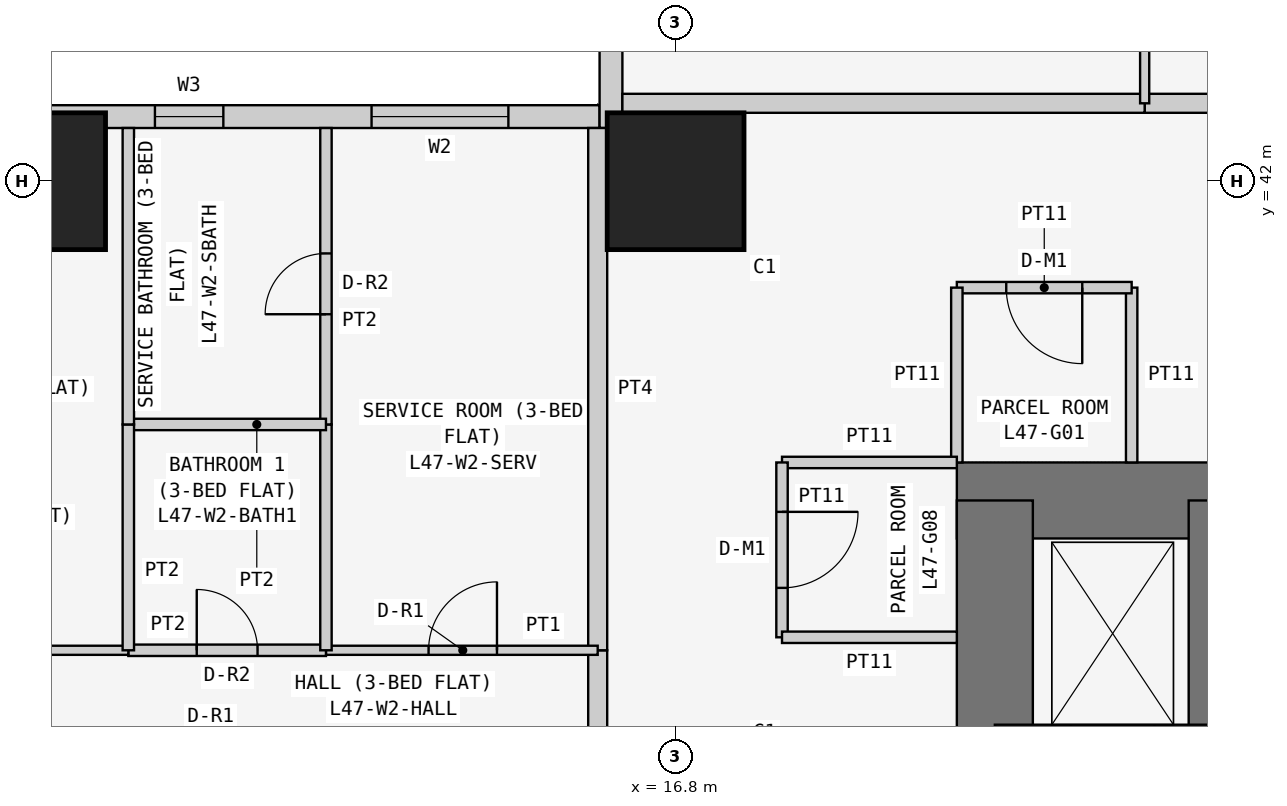
"""IFC4 building model, lengths in metres.
Left out: names, types, materials, properties, quantities, classifications, styles, units other than length and angle.
Written with IfcOpenShell. Run it as: python <this file> out.ifc"""

import sys

from ifc_helpers import new_model, si_unit, direction, frame, frame_2d, origin, origin_2d, place, context, subcontext, project, spatial, rectangle, extrude, element, fill, save


model = new_model("IFC4")
c1 = context("Model", 3, precision=1e-05, world=origin(), true_north=direction((0.0, 1.0)))
c2 = subcontext(c1, "Body", "Model", "MODEL_VIEW")
j1 = project(units=[si_unit("LENGTHUNIT", "METRE"), si_unit("PLANEANGLEUNIT", "RADIAN")], contexts=[c1])
p1 = place(None, origin())
s1 = spatial("IfcSite", under=j1, at=p1, CompositionType="ELEMENT")
p2 = place(p1, origin())
s2 = spatial("IfcBuilding", under=s1, at=p2, CompositionType="ELEMENT")
p3 = place(p2, frame((0.0, 0.0, 183.3)))
s3 = spatial("IfcBuildingStorey", under=s2, at=p3, CompositionType="ELEMENT", Elevation=183.3)
for number, where, z_axis, x_axis in (
    (1, (8.4, 42.0, 0.0), (0.0, 0.0, 1.0), (1.0, 0.0, 0.0)),
    (2, (16.8, 42.0, 0.0), (0.0, 0.0, 1.0), (1.0, 0.0, 0.0)),
):
    element("IfcColumn", number, at=place(p3, frame(where, z_axis=z_axis, x_axis=x_axis)), inside=s3, PredefinedType="COLUMN", context=c2, shape_type="SweptSolid", body=[
        extrude(rectangle(XDim=1.8, YDim=1.8, at=origin_2d()), origin(), (0.0, 0.0, 1.0), 3.6),
    ])
p4 = place(p3, frame((37.8, 37.8, 0.0), z_axis=(0.0, 0.0, 1.0), x_axis=(-1.0, 0.0, 0.0)))
e3 = element("IfcWall", 3, at=p4, inside=s3, PredefinedType="SHEAR", context=c2, shape_type="SweptSolid", body=[
    extrude(rectangle(XDim=17.3, YDim=1.0, at=frame_2d((8.65, 0.0))), origin(), (0.0, 0.0, 1.0), 3.6),
])
p5 = place(p3, frame((21.0, 37.8, 0.0), z_axis=(0.0, 0.0, 1.0), x_axis=(0.0, -1.0, 0.0)))
e4 = element("IfcWall", 4, at=p5, inside=s3, PredefinedType="SHEAR", context=c2, shape_type="SweptSolid", body=[
    extrude(rectangle(XDim=17.3, YDim=1.0, at=frame_2d((8.65, 0.0))), origin(), (0.0, 0.0, 1.0), 3.6),
])
p6 = place(p5, frame((5.4, 0.0, 0.0)))
e5 = element("IfcOpeningElement", 5, at=p6, cuts=e4, PredefinedType="OPENING", context=c2, shape_type="SweptSolid", body=[
    extrude(rectangle(XDim=1.2, YDim=2.1, at=frame_2d((0.6, 1.05))), frame((0.0, 0.51, 0.0), z_axis=(0.0, -1.0, 0.0), x_axis=(1.0, 0.0, 0.0)), (0.0, 0.0, 1.0), 1.02),
])
p7 = place(p3, frame((21.0, 34.6, 0.0), z_axis=(0.0, 0.0, 1.0), x_axis=(1.0, 0.0, 0.0)))
e6 = element("IfcWall", 6, at=p7, inside=s3, PredefinedType="SHEAR", context=c2, shape_type="SweptSolid", body=[
    extrude(rectangle(XDim=11.2, YDim=0.5, at=frame_2d((5.6, 0.0))), origin(), (0.0, 0.0, 1.0), 3.6),
])
p8 = place(p7, frame((9.25, 0.0, 0.0)))
e7 = element("IfcOpeningElement", 7, at=p8, cuts=e6, PredefinedType="OPENING", context=c2, shape_type="SweptSolid", body=[
    extrude(rectangle(XDim=1.1, YDim=2.1, at=frame_2d((0.55, 1.05))), frame((0.0, 0.26, 0.0), z_axis=(0.0, -1.0, 0.0), x_axis=(1.0, 0.0, 0.0)), (0.0, 0.0, 1.0), 0.52),
])
p9 = place(p7, frame((1.0, 0.0, 0.0)))
e8 = element("IfcOpeningElement", 8, at=p9, cuts=e6, PredefinedType="OPENING", context=c2, shape_type="SweptSolid", body=[
    extrude(rectangle(XDim=1.1, YDim=2.1, at=frame_2d((0.55, 1.05))), frame((0.0, 0.26, 0.0), z_axis=(0.0, -1.0, 0.0), x_axis=(1.0, 0.0, 0.0)), (0.0, 0.0, 1.0), 0.52),
])
p10 = place(p7, frame((3.65, 0.0, 0.0)))
e9 = element("IfcOpeningElement", 9, at=p10, cuts=e6, PredefinedType="OPENING", context=c2, shape_type="SweptSolid", body=[
    extrude(rectangle(XDim=1.1, YDim=2.1, at=frame_2d((0.55, 1.05))), frame((0.0, 0.26, 0.0), z_axis=(0.0, -1.0, 0.0), x_axis=(1.0, 0.0, 0.0)), (0.0, 0.0, 1.0), 0.52),
])
p11 = place(p7, frame((6.35, 0.0, 0.0)))
e10 = element("IfcOpeningElement", 10, at=p11, cuts=e6, PredefinedType="OPENING", context=c2, shape_type="SweptSolid", body=[
    extrude(rectangle(XDim=1.3, YDim=2.1, at=frame_2d((0.65, 1.05))), frame((0.0, 0.26, 0.0), z_axis=(0.0, -1.0, 0.0), x_axis=(1.0, 0.0, 0.0)), (0.0, 0.0, 1.0), 0.52),
])
p12 = place(p3, frame((23.8, 34.6, 0.0), z_axis=(0.0, 0.0, 1.0), x_axis=(0.0, 1.0, 0.0)))
e11 = element("IfcWall", 11, at=p12, inside=s3, PredefinedType="SHEAR", context=c2, shape_type="SweptSolid", body=[
    extrude(rectangle(XDim=3.2, YDim=0.5, at=frame_2d((1.6, 0.0))), origin(), (0.0, 0.0, 1.0), 3.6),
])
p13 = place(p3, frame((15.8, 42.85, 0.0), z_axis=(0.0, 0.0, 1.0), x_axis=(-1.0, 0.0, 0.0)))
e12 = element("IfcWall", 12, at=p13, inside=s3, PredefinedType="SOLIDWALL", context=c2, shape_type="SweptSolid", body=[
    extrude(rectangle(XDim=15.4, YDim=0.3, at=frame_2d((7.7, 0.0))), origin(), (0.0, 0.0, 1.0), 3.45),
])
p14 = place(p13, frame((1.2, 0.0, 0.9)))
e13 = element("IfcOpeningElement", 13, at=p14, cuts=e12, PredefinedType="OPENING", context=c2, shape_type="SweptSolid", body=[
    extrude(rectangle(XDim=1.8, YDim=1.5, at=frame_2d((0.9, 0.75))), frame((0.0, 0.16, 0.0), z_axis=(0.0, -1.0, 0.0), x_axis=(1.0, 0.0, 0.0)), (0.0, 0.0, 1.0), 0.32),
])
p15 = place(p13, frame((4.95, 0.0, 1.5)))
e14 = element("IfcOpeningElement", 14, at=p15, cuts=e12, PredefinedType="OPENING", context=c2, shape_type="SweptSolid", body=[
    extrude(rectangle(XDim=0.9, YDim=0.7, at=frame_2d((0.45, 0.35))), frame((0.0, 0.16, 0.0), z_axis=(0.0, -1.0, 0.0), x_axis=(1.0, 0.0, 0.0)), (0.0, 0.0, 1.0), 0.32),
])
p16 = place(p13, frame((8.5, 0.0, 0.9)))
e15 = element("IfcOpeningElement", 15, at=p16, cuts=e12, PredefinedType="OPENING", context=c2, shape_type="SweptSolid", body=[
    extrude(rectangle(XDim=1.8, YDim=1.5, at=frame_2d((0.9, 0.75))), frame((0.0, 0.16, 0.0), z_axis=(0.0, -1.0, 0.0), x_axis=(1.0, 0.0, 0.0)), (0.0, 0.0, 1.0), 0.32),
])
p17 = place(p13, frame((12.5, 0.0, 0.0)))
e16 = element("IfcOpeningElement", 16, at=p17, cuts=e12, PredefinedType="OPENING", context=c2, shape_type="SweptSolid", body=[
    extrude(rectangle(XDim=0.9, YDim=2.4, at=frame_2d((0.45, 1.2))), frame((0.0, 0.16, 0.0), z_axis=(0.0, -1.0, 0.0), x_axis=(1.0, 0.0, 0.0)), (0.0, 0.0, 1.0), 0.32),
])
p18 = place(p13, frame((13.5, 0.0, 0.9)))
e17 = element("IfcOpeningElement", 17, at=p18, cuts=e12, PredefinedType="OPENING", context=c2, shape_type="SweptSolid", body=[
    extrude(rectangle(XDim=1.2, YDim=1.5, at=frame_2d((0.6, 0.75))), frame((0.0, 0.16, 0.0), z_axis=(0.0, -1.0, 0.0), x_axis=(1.0, 0.0, 0.0)), (0.0, 0.0, 1.0), 0.32),
])
p19 = place(p3, frame((15.95, 50.0, 0.0), z_axis=(0.0, 0.0, 1.0), x_axis=(0.0, -1.0, 0.0)))
e18 = element("IfcWall", 18, at=p19, inside=s3, PredefinedType="SOLIDWALL", context=c2, shape_type="SweptSolid", body=[
    extrude(rectangle(XDim=7.3, YDim=0.3, at=frame_2d((3.65, 0.0))), origin(), (0.0, 0.0, 1.0), 3.45),
])
p20 = place(p19, frame((3.1, 0.0, 0.9)))
e19 = element("IfcOpeningElement", 19, at=p20, cuts=e18, PredefinedType="OPENING", context=c2, shape_type="SweptSolid", body=[
    extrude(rectangle(XDim=2.4, YDim=1.5, at=frame_2d((1.2, 0.75))), frame((0.0, 0.16, 0.0), z_axis=(0.0, -1.0, 0.0), x_axis=(1.0, 0.0, 0.0)), (0.0, 0.0, 1.0), 0.32),
])
p21 = place(p19, frame((0.75, 0.0, 0.9)))
e20 = element("IfcOpeningElement", 20, at=p21, cuts=e18, PredefinedType="OPENING", context=c2, shape_type="SweptSolid", body=[
    extrude(rectangle(XDim=1.2, YDim=1.5, at=frame_2d((0.6, 0.75))), frame((0.0, 0.16, 0.0), z_axis=(0.0, -1.0, 0.0), x_axis=(1.0, 0.0, 0.0)), (0.0, 0.0, 1.0), 0.32),
])
p22 = place(p3, frame((22.8, 38.3, 0.0), z_axis=(0.0, 0.0, 1.0), x_axis=(0.0, 1.0, 0.0)))
e21 = element("IfcWall", 21, at=p22, inside=s3, PredefinedType="PARTITIONING", context=c2, shape_type="SweptSolid", body=[
    extrude(rectangle(XDim=2.3, YDim=0.15, at=frame_2d((1.15, 0.0))), origin(), (0.0, 0.0, 1.0), 3.45),
])
p23 = place(p3, frame((22.8, 40.6, 0.0), z_axis=(0.0, 0.0, 1.0), x_axis=(-1.0, 0.0, 0.0)))
e22 = element("IfcWall", 22, at=p23, inside=s3, PredefinedType="PARTITIONING", context=c2, shape_type="SweptSolid", body=[
    extrude(rectangle(XDim=2.3, YDim=0.15, at=frame_2d((1.15, 0.0))), origin(), (0.0, 0.0, 1.0), 3.45),
])
p24 = place(p23, frame((0.65, 0.0, 0.0)))
e23 = element("IfcOpeningElement", 23, at=p24, cuts=e22, PredefinedType="OPENING", context=c2, shape_type="SweptSolid", body=[
    extrude(rectangle(XDim=1.0, YDim=2.1, at=frame_2d((0.5, 1.05))), frame((0.0, 0.085, 0.0), z_axis=(0.0, -1.0, 0.0), x_axis=(1.0, 0.0, 0.0)), (0.0, 0.0, 1.0), 0.17),
])
for number, where, z_axis, x_axis in (
    (24, (20.5, 40.6, 0.0), (0.0, 0.0, 1.0), (0.0, -1.0, 0.0)),
    (25, (20.5, 38.3, 0.0), (0.0, 0.0, 1.0), (-1.0, 0.0, 0.0)),
):
    element("IfcWall", number, at=place(p3, frame(where, z_axis=z_axis, x_axis=x_axis)), inside=s3, PredefinedType="PARTITIONING", context=c2, shape_type="SweptSolid", body=[
        extrude(rectangle(XDim=2.3, YDim=0.15, at=frame_2d((1.15, 0.0))), origin(), (0.0, 0.0, 1.0), 3.45),
    ])
p25 = place(p3, frame((18.2, 38.3, 0.0), z_axis=(0.0, 0.0, 1.0), x_axis=(0.0, -1.0, 0.0)))
e26 = element("IfcWall", 26, at=p25, inside=s3, PredefinedType="PARTITIONING", context=c2, shape_type="SweptSolid", body=[
    extrude(rectangle(XDim=2.3, YDim=0.15, at=frame_2d((1.15, 0.0))), origin(), (0.0, 0.0, 1.0), 3.45),
])
p26 = place(p25, frame((0.65, 0.0, 0.0)))
e27 = element("IfcOpeningElement", 27, at=p26, cuts=e26, PredefinedType="OPENING", context=c2, shape_type="SweptSolid", body=[
    extrude(rectangle(XDim=1.0, YDim=2.1, at=frame_2d((0.5, 1.05))), frame((0.0, 0.085, 0.0), z_axis=(0.0, -1.0, 0.0), x_axis=(1.0, 0.0, 0.0)), (0.0, 0.0, 1.0), 0.17),
])
p27 = place(p3, frame((18.2, 36.0, 0.0), z_axis=(0.0, 0.0, 1.0), x_axis=(1.0, 0.0, 0.0)))
e28 = element("IfcWall", 28, at=p27, inside=s3, PredefinedType="PARTITIONING", context=c2, shape_type="SweptSolid", body=[
    extrude(rectangle(XDim=2.3, YDim=0.15, at=frame_2d((1.15, 0.0))), origin(), (0.0, 0.0, 1.0), 3.45),
])
p28 = place(p3, frame((22.971, 43.025, 0.0), z_axis=(0.0, 0.0, 1.0), x_axis=(1.0, 0.0, 0.0)))
e29 = element("IfcWall", 29, at=p28, inside=s3, PredefinedType="PARTITIONING", context=c2, shape_type="SweptSolid", body=[
    extrude(rectangle(XDim=6.429, YDim=0.25, at=frame_2d((3.214, 0.0))), origin(), (0.0, 0.0, 1.0), 3.45),
])
p29 = place(p28, frame((4.929, 0.0, 0.0)))
e30 = element("IfcOpeningElement", 30, at=p29, cuts=e29, PredefinedType="OPENING", context=c2, shape_type="SweptSolid", body=[
    extrude(rectangle(XDim=1.0, YDim=2.1, at=frame_2d((0.5, 1.05))), frame((0.0, 0.135, 0.0), z_axis=(0.0, -1.0, 0.0), x_axis=(1.0, 0.0, 0.0)), (0.0, 0.0, 1.0), 0.27),
])
p30 = place(p3, frame((16.1, 43.025, 0.0), z_axis=(0.0, 0.0, 1.0), x_axis=(1.0, 0.0, 0.0)))
e31 = element("IfcWall", 31, at=p30, inside=s3, PredefinedType="PARTITIONING", context=c2, shape_type="SweptSolid", body=[
    extrude(rectangle(XDim=6.871, YDim=0.25, at=frame_2d((3.436, 0.0))), origin(), (0.0, 0.0, 1.0), 3.45),
])
p31 = place(p3, frame((15.775, 34.629, 0.0), z_axis=(0.0, 0.0, 1.0), x_axis=(0.0, 1.0, 0.0)))
e32 = element("IfcWall", 32, at=p31, inside=s3, PredefinedType="PARTITIONING", context=c2, shape_type="SweptSolid", body=[
    extrude(rectangle(XDim=1.2, YDim=0.25, at=frame_2d((0.6, 0.0))), origin(), (0.0, 0.0, 1.0), 3.45),
])
p32 = place(p3, frame((15.775, 35.829, 0.0), z_axis=(0.0, 0.0, 1.0), x_axis=(0.0, 1.0, 0.0)))
e33 = element("IfcWall", 33, at=p32, inside=s3, PredefinedType="PARTITIONING", context=c2, shape_type="SweptSolid", body=[
    extrude(rectangle(XDim=6.871, YDim=0.25, at=frame_2d((3.436, 0.0))), origin(), (0.0, 0.0, 1.0), 3.45),
])
p33 = place(p3, frame((22.971, 43.025, 0.0), z_axis=(0.0, 0.0, 1.0), x_axis=(0.0, 1.0, 0.0)))
e34 = element("IfcWall", 34, at=p33, inside=s3, PredefinedType="PARTITIONING", context=c2, shape_type="SweptSolid", body=[
    extrude(rectangle(XDim=4.775, YDim=0.12, at=frame_2d((2.388, 0.0))), origin(), (0.0, 0.0, 1.0), 3.45),
])
p34 = place(p33, frame((2.025, 0.0, 0.0)))
e35 = element("IfcOpeningElement", 35, at=p34, cuts=e34, PredefinedType="OPENING", context=c2, shape_type="SweptSolid", body=[
    extrude(rectangle(XDim=0.9, YDim=2.1, at=frame_2d((0.45, 1.05))), frame((0.0, 0.07, 0.0), z_axis=(0.0, -1.0, 0.0), x_axis=(1.0, 0.0, 0.0)), (0.0, 0.0, 1.0), 0.14),
])
p35 = place(p3, frame((12.2, 35.829, 0.0), z_axis=(0.0, 0.0, 1.0), x_axis=(1.0, 0.0, 0.0)))
e36 = element("IfcWall", 36, at=p35, inside=s3, PredefinedType="PARTITIONING", context=c2, shape_type="SweptSolid", body=[
    extrude(rectangle(XDim=3.575, YDim=0.12, at=frame_2d((1.788, 0.0))), origin(), (0.0, 0.0, 1.0), 3.45),
])
p36 = place(p35, frame((1.35, 0.0, 0.0)))
e37 = element("IfcOpeningElement", 37, at=p36, cuts=e36, PredefinedType="OPENING", context=c2, shape_type="SweptSolid", body=[
    extrude(rectangle(XDim=0.9, YDim=2.1, at=frame_2d((0.45, 1.05))), frame((0.0, 0.07, 0.0), z_axis=(0.0, -1.0, 0.0), x_axis=(1.0, 0.0, 0.0)), (0.0, 0.0, 1.0), 0.14),
])
p37 = place(p3, frame((9.6, 35.829, 0.0), z_axis=(0.0, 0.0, 1.0), x_axis=(1.0, 0.0, 0.0)))
e38 = element("IfcWall", 38, at=p37, inside=s3, PredefinedType="PARTITIONING", context=c2, shape_type="SweptSolid", body=[
    extrude(rectangle(XDim=2.6, YDim=0.15, at=frame_2d((1.3, 0.0))), origin(), (0.0, 0.0, 1.0), 3.45),
])
p38 = place(p37, frame((0.9, 0.0, 0.0)))
e39 = element("IfcOpeningElement", 39, at=p38, cuts=e38, PredefinedType="OPENING", context=c2, shape_type="SweptSolid", body=[
    extrude(rectangle(XDim=0.8, YDim=2.1, at=frame_2d((0.4, 1.05))), frame((0.0, 0.085, 0.0), z_axis=(0.0, -1.0, 0.0), x_axis=(1.0, 0.0, 0.0)), (0.0, 0.0, 1.0), 0.17),
])
p39 = place(p3, frame((4.7, 35.829, 0.0), z_axis=(0.0, 0.0, 1.0), x_axis=(1.0, 0.0, 0.0)))
e40 = element("IfcWall", 40, at=p39, inside=s3, PredefinedType="PARTITIONING", context=c2, shape_type="SweptSolid", body=[
    extrude(rectangle(XDim=4.9, YDim=0.12, at=frame_2d((2.45, 0.0))), origin(), (0.0, 0.0, 1.0), 3.45),
])
p40 = place(p39, frame((1.65, 0.0, 0.0)))
e41 = element("IfcOpeningElement", 41, at=p40, cuts=e40, PredefinedType="OPENING", context=c2, shape_type="SweptSolid", body=[
    extrude(rectangle(XDim=0.9, YDim=2.1, at=frame_2d((0.45, 1.05))), frame((0.0, 0.07, 0.0), z_axis=(0.0, -1.0, 0.0), x_axis=(1.0, 0.0, 0.0)), (0.0, 0.0, 1.0), 0.14),
])
p41 = place(p3, frame((12.2, 35.829, 0.0), z_axis=(0.0, 0.0, 1.0), x_axis=(0.0, 1.0, 0.0)))
e42 = element("IfcWall", 42, at=p41, inside=s3, PredefinedType="PARTITIONING", context=c2, shape_type="SweptSolid", body=[
    extrude(rectangle(XDim=2.971, YDim=0.15, at=frame_2d((1.485, 0.0))), origin(), (0.0, 0.0, 1.0), 3.45),
])
p42 = place(p3, frame((12.2, 38.8, 0.0), z_axis=(0.0, 0.0, 1.0), x_axis=(0.0, 1.0, 0.0)))
e43 = element("IfcWall", 43, at=p42, inside=s3, PredefinedType="PARTITIONING", context=c2, shape_type="SweptSolid", body=[
    extrude(rectangle(XDim=3.9, YDim=0.15, at=frame_2d((1.95, 0.0))), origin(), (0.0, 0.0, 1.0), 3.45),
])
p43 = place(p42, frame((1.45, 0.0, 0.0)))
e44 = element("IfcOpeningElement", 44, at=p43, cuts=e43, PredefinedType="OPENING", context=c2, shape_type="SweptSolid", body=[
    extrude(rectangle(XDim=0.8, YDim=2.1, at=frame_2d((0.4, 1.05))), frame((0.0, 0.085, 0.0), z_axis=(0.0, -1.0, 0.0), x_axis=(1.0, 0.0, 0.0)), (0.0, 0.0, 1.0), 0.17),
])
p44 = place(p3, frame((9.6, 38.8, 0.0), z_axis=(0.0, 0.0, 1.0), x_axis=(1.0, 0.0, 0.0)))
e45 = element("IfcWall", 45, at=p44, inside=s3, PredefinedType="PARTITIONING", context=c2, shape_type="SweptSolid", body=[
    extrude(rectangle(XDim=2.6, YDim=0.15, at=frame_2d((1.3, 0.0))), origin(), (0.0, 0.0, 1.0), 3.45),
])
p45 = place(p3, frame((9.6, 35.829, 0.0), z_axis=(0.0, 0.0, 1.0), x_axis=(0.0, 1.0, 0.0)))
e46 = element("IfcWall", 46, at=p45, inside=s3, PredefinedType="PARTITIONING", context=c2, shape_type="SweptSolid", body=[
    extrude(rectangle(XDim=2.971, YDim=0.15, at=frame_2d((1.485, 0.0))), origin(), (0.0, 0.0, 1.0), 3.45),
])
p46 = place(p3, frame((9.6, 38.8, 0.0), z_axis=(0.0, 0.0, 1.0), x_axis=(0.0, 1.0, 0.0)))
e47 = element("IfcWall", 47, at=p46, inside=s3, PredefinedType="PARTITIONING", context=c2, shape_type="SweptSolid", body=[
    extrude(rectangle(XDim=3.9, YDim=0.15, at=frame_2d((1.95, 0.0))), origin(), (0.0, 0.0, 1.0), 3.45),
])
p47 = place(p14, origin())
e48 = element("IfcWindow", 48, at=p47, inside=s3, PartitioningType="SINGLE_PANEL", PredefinedType="WINDOW", context=c2, shape_type="SweptSolid", body=[
    extrude(rectangle(XDim=1.8, YDim=1.5, at=frame_2d((0.9, 0.75))), frame((0.0, 0.03, 0.0), z_axis=(0.0, -1.0, 0.0), x_axis=(1.0, 0.0, 0.0)), (0.0, 0.0, 1.0), 0.06),
])
fill(e13, e48)
p48 = place(p15, origin())
e49 = element("IfcWindow", 49, at=p48, inside=s3, PartitioningType="SINGLE_PANEL", PredefinedType="WINDOW", context=c2, shape_type="SweptSolid", body=[
    extrude(rectangle(XDim=0.9, YDim=0.7, at=frame_2d((0.45, 0.35))), frame((0.0, 0.03, 0.0), z_axis=(0.0, -1.0, 0.0), x_axis=(1.0, 0.0, 0.0)), (0.0, 0.0, 1.0), 0.06),
])
fill(e14, e49)
p49 = place(p24, origin())
e50 = element("IfcDoor", 50, at=p49, inside=s3, OperationType="SINGLE_SWING_LEFT", PredefinedType="DOOR", context=c2, shape_type="SweptSolid", body=[
    extrude(rectangle(XDim=1.0, YDim=2.1, at=frame_2d((0.5, 1.05))), frame((0.0, 0.025, 0.0), z_axis=(0.0, -1.0, 0.0), x_axis=(1.0, 0.0, 0.0)), (0.0, 0.0, 1.0), 0.05),
])
fill(e23, e50)
p50 = place(p26, origin())
e51 = element("IfcDoor", 51, at=p50, inside=s3, OperationType="SINGLE_SWING_LEFT", PredefinedType="DOOR", context=c2, shape_type="SweptSolid", body=[
    extrude(rectangle(XDim=1.0, YDim=2.1, at=frame_2d((0.5, 1.05))), frame((0.0, 0.025, 0.0), z_axis=(0.0, -1.0, 0.0), x_axis=(1.0, 0.0, 0.0)), (0.0, 0.0, 1.0), 0.05),
])
fill(e27, e51)
p51 = place(p36, origin())
e52 = element("IfcDoor", 52, at=p51, inside=s3, OperationType="SINGLE_SWING_RIGHT", PredefinedType="DOOR", context=c2, shape_type="SweptSolid", body=[
    extrude(rectangle(XDim=0.9, YDim=2.1, at=frame_2d((0.45, 1.05))), frame((0.0, 0.025, 0.0), z_axis=(0.0, -1.0, 0.0), x_axis=(1.0, 0.0, 0.0)), (0.0, 0.0, 1.0), 0.05),
])
fill(e37, e52)
p52 = place(p43, origin())
e53 = element("IfcDoor", 53, at=p52, inside=s3, OperationType="SINGLE_SWING_LEFT", PredefinedType="DOOR", context=c2, shape_type="SweptSolid", body=[
    extrude(rectangle(XDim=0.8, YDim=2.1, at=frame_2d((0.4, 1.05))), frame((0.0, 0.025, 0.0), z_axis=(0.0, -1.0, 0.0), x_axis=(1.0, 0.0, 0.0)), (0.0, 0.0, 1.0), 0.05),
])
fill(e44, e53)
p53 = place(p38, origin())
e54 = element("IfcDoor", 54, at=p53, inside=s3, OperationType="SINGLE_SWING_LEFT", PredefinedType="DOOR", context=c2, shape_type="SweptSolid", body=[
    extrude(rectangle(XDim=0.8, YDim=2.1, at=frame_2d((0.4, 1.05))), frame((0.0, 0.025, 0.0), z_axis=(0.0, -1.0, 0.0), x_axis=(1.0, 0.0, 0.0)), (0.0, 0.0, 1.0), 0.05),
])
fill(e39, e54)
save(model, sys.argv[1])
